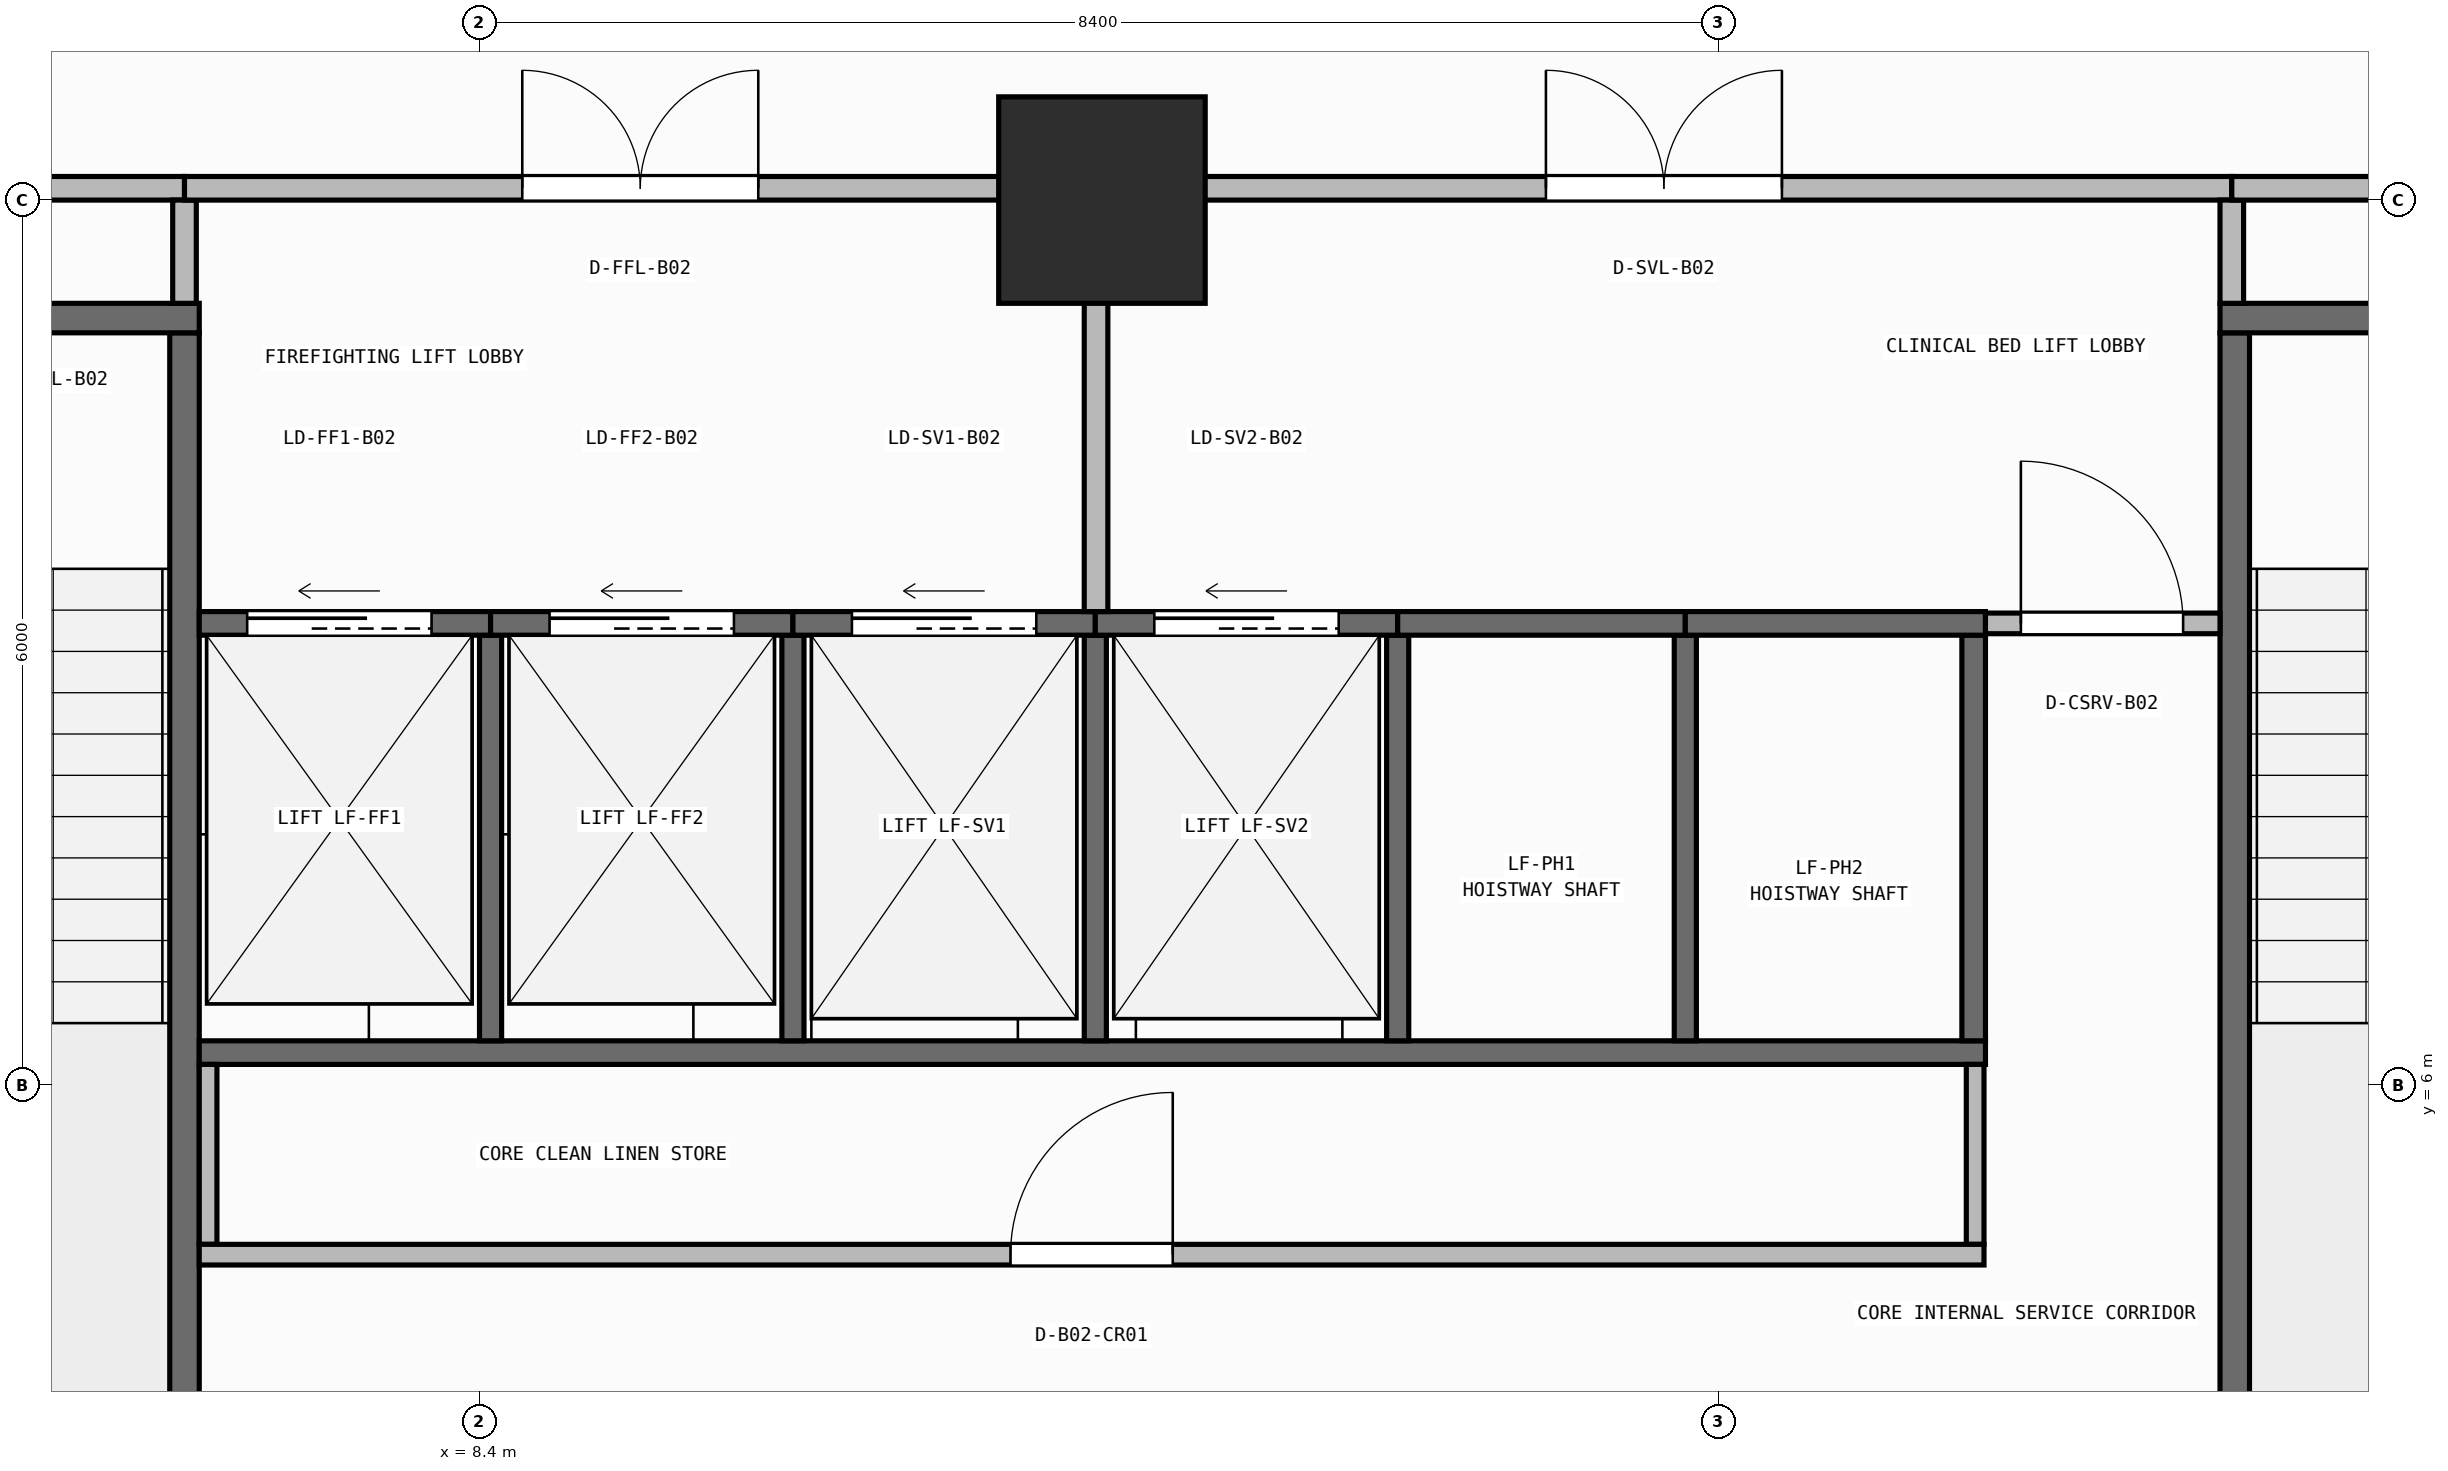
"""IFC4 building model, lengths in metres.
Left out: names, types, materials, properties, quantities, classifications, styles, units other than length and angle.
Written with IfcOpenShell. Run it as: python <this file> out.ifc"""

import sys

from ifc_helpers import new_model, si_unit, direction, frame, frame_2d, origin, origin_2d, place, context, subcontext, project, spatial, rectangle, extrude, element, fill, save


model = new_model("IFC4")
c1 = context("Model", 3, precision=1e-05, world=origin(), true_north=direction((0.0, 1.0)))
c2 = subcontext(c1, "Body", "Model", "MODEL_VIEW")
j1 = project(units=[si_unit("LENGTHUNIT", "METRE"), si_unit("PLANEANGLEUNIT", "RADIAN")], contexts=[c1])
p1 = place(None, origin())
s1 = spatial("IfcSite", under=j1, at=p1, CompositionType="ELEMENT")
p2 = place(p1, origin())
s2 = spatial("IfcBuilding", under=s1, at=p2, CompositionType="ELEMENT")
p3 = place(p2, frame((0.0, 0.0, -9.0)))
s3 = spatial("IfcBuildingStorey", under=s2, at=p3, CompositionType="ELEMENT", Elevation=-9.0)
p4 = place(p3, frame((12.62, 12.0, 0.0), z_axis=(0.0, 0.0, 1.0), x_axis=(1.0, 0.0, 0.0)))
e1 = element("IfcColumn", 1, at=p4, inside=s3, PredefinedType="COLUMN", context=c2, shape_type="SweptSolid", body=[
    extrude(rectangle(XDim=1.4, YDim=1.4, at=origin_2d()), origin(), (0.0, 0.0, 1.0), 4.5),
])
p5 = place(p3, frame((6.4, 3.5, 0.0), z_axis=(0.0, 0.0, 1.0), x_axis=(0.0, 1.0, 0.0)))
e2 = element("IfcWall", 2, at=p5, inside=s3, PredefinedType="SHEAR", context=c2, shape_type="SweptSolid", body=[
    extrude(rectangle(XDim=7.6, YDim=0.2, at=frame_2d((3.8, 0.0))), origin(), (0.0, 0.0, 1.0), 4.24),
])
p6 = place(p3, frame((2.8, 11.2, 0.0), z_axis=(0.0, 0.0, 1.0), x_axis=(1.0, 0.0, 0.0)))
e3 = element("IfcWall", 3, at=p6, inside=s3, PredefinedType="SHEAR", context=c2, shape_type="SweptSolid", body=[
    extrude(rectangle(XDim=3.7, YDim=0.2, at=frame_2d((1.85, 0.0))), origin(), (0.0, 0.0, 1.0), 4.24),
])
p7 = place(p6, frame((1.2, 0.0, 0.0)))
e4 = element("IfcOpeningElement", 4, at=p7, cuts=e3, PredefinedType="OPENING", context=c2, shape_type="SweptSolid", body=[
    extrude(rectangle(XDim=1.3, YDim=2.15, at=frame_2d((0.65, 1.075))), frame((0.0, 0.11, 0.0), z_axis=(0.0, -1.0, 0.0), x_axis=(1.0, 0.0, 0.0)), (0.0, 0.0, 1.0), 0.22),
])
p8 = place(p3, frame((20.3, 3.5, 0.0), z_axis=(0.0, 0.0, 1.0), x_axis=(0.0, 1.0, 0.0)))
e5 = element("IfcWall", 5, at=p8, inside=s3, PredefinedType="SHEAR", context=c2, shape_type="SweptSolid", body=[
    extrude(rectangle(XDim=7.6, YDim=0.2, at=frame_2d((3.8, 0.0))), origin(), (0.0, 0.0, 1.0), 4.24),
])
p9 = place(p3, frame((20.2, 11.2, 0.0), z_axis=(0.0, 0.0, 1.0), x_axis=(1.0, 0.0, 0.0)))
e6 = element("IfcWall", 6, at=p9, inside=s3, PredefinedType="SHEAR", context=c2, shape_type="SweptSolid", body=[
    extrude(rectangle(XDim=3.7, YDim=0.2, at=frame_2d((1.85, 0.0))), origin(), (0.0, 0.0, 1.0), 4.24),
])
p10 = place(p9, frame((1.2, 0.0, 0.0)))
e7 = element("IfcOpeningElement", 7, at=p10, cuts=e6, PredefinedType="OPENING", context=c2, shape_type="SweptSolid", body=[
    extrude(rectangle(XDim=1.3, YDim=2.15, at=frame_2d((0.65, 1.075))), frame((0.0, 0.11, 0.0), z_axis=(0.0, -1.0, 0.0), x_axis=(1.0, 0.0, 0.0)), (0.0, 0.0, 1.0), 0.22),
])
p11 = place(p3, frame((6.5, 6.22, 0.0), z_axis=(0.0, 0.0, 1.0), x_axis=(1.0, 0.0, 0.0)))
e8 = element("IfcWall", 8, at=p11, inside=s3, PredefinedType="SHEAR", context=c2, shape_type="SweptSolid", body=[
    extrude(rectangle(XDim=12.11, YDim=0.16, at=frame_2d((6.055, 0.0))), origin(), (0.0, 0.0, 1.0), 4.24),
])
p12 = place(p3, frame((18.53, 6.3, 0.0), z_axis=(0.0, 0.0, 1.0), x_axis=(0.0, 1.0, 0.0)))
e9 = element("IfcWall", 9, at=p12, inside=s3, PredefinedType="SHEAR", context=c2, shape_type="SweptSolid", body=[
    extrude(rectangle(XDim=2.75, YDim=0.16, at=frame_2d((1.375, 0.0))), origin(), (0.0, 0.0, 1.0), 4.24),
])
for number, where, z_axis, x_axis in (
    (10, (8.475, 6.3, 0.0), (0.0, 0.0, 1.0), (0.0, 1.0, 0.0)),
    (11, (10.525, 6.3, 0.0), (0.0, 0.0, 1.0), (0.0, 1.0, 0.0)),
    (12, (12.575, 6.3, 0.0), (0.0, 0.0, 1.0), (0.0, 1.0, 0.0)),
    (13, (14.625, 6.3, 0.0), (0.0, 0.0, 1.0), (0.0, 1.0, 0.0)),
    (14, (16.575, 6.3, 0.0), (0.0, 0.0, 1.0), (0.0, 1.0, 0.0)),
):
    element("IfcWall", number, at=place(p3, frame(where, z_axis=z_axis, x_axis=x_axis)), inside=s3, PredefinedType="SHEAR", context=c2, shape_type="SweptSolid", body=[
        extrude(rectangle(XDim=2.75, YDim=0.15, at=frame_2d((1.375, 0.0))), origin(), (0.0, 0.0, 1.0), 4.24),
    ])
p13 = place(p3, frame((6.5, 9.13, 0.0), z_axis=(0.0, 0.0, 1.0), x_axis=(1.0, 0.0, 0.0)))
e15 = element("IfcWall", 15, at=p13, inside=s3, PredefinedType="SHEAR", context=c2, shape_type="SweptSolid", body=[
    extrude(rectangle(XDim=1.975, YDim=0.16, at=frame_2d((0.988, 0.0))), origin(), (0.0, 0.0, 1.0), 4.24),
])
p14 = place(p13, frame((0.325, 0.0, 0.0)))
e16 = element("IfcOpeningElement", 16, at=p14, cuts=e15, PredefinedType="OPENING", context=c2, shape_type="SweptSolid", body=[
    extrude(rectangle(XDim=1.25, YDim=2.15, at=frame_2d((0.625, 1.075))), frame((0.0, 0.09, 0.0), z_axis=(0.0, -1.0, 0.0), x_axis=(1.0, 0.0, 0.0)), (0.0, 0.0, 1.0), 0.18),
])
p15 = place(p3, frame((8.475, 9.13, 0.0), z_axis=(0.0, 0.0, 1.0), x_axis=(1.0, 0.0, 0.0)))
e17 = element("IfcWall", 17, at=p15, inside=s3, PredefinedType="SHEAR", context=c2, shape_type="SweptSolid", body=[
    extrude(rectangle(XDim=2.05, YDim=0.16, at=frame_2d((1.025, 0.0))), origin(), (0.0, 0.0, 1.0), 4.24),
])
p16 = place(p15, frame((0.4, 0.0, 0.0)))
e18 = element("IfcOpeningElement", 18, at=p16, cuts=e17, PredefinedType="OPENING", context=c2, shape_type="SweptSolid", body=[
    extrude(rectangle(XDim=1.25, YDim=2.15, at=frame_2d((0.625, 1.075))), frame((0.0, 0.09, 0.0), z_axis=(0.0, -1.0, 0.0), x_axis=(1.0, 0.0, 0.0)), (0.0, 0.0, 1.0), 0.18),
])
p17 = place(p3, frame((10.525, 9.13, 0.0), z_axis=(0.0, 0.0, 1.0), x_axis=(1.0, 0.0, 0.0)))
e19 = element("IfcWall", 19, at=p17, inside=s3, PredefinedType="SHEAR", context=c2, shape_type="SweptSolid", body=[
    extrude(rectangle(XDim=2.05, YDim=0.16, at=frame_2d((1.025, 0.0))), origin(), (0.0, 0.0, 1.0), 4.24),
])
p18 = place(p17, frame((0.4, 0.0, 0.0)))
e20 = element("IfcOpeningElement", 20, at=p18, cuts=e19, PredefinedType="OPENING", context=c2, shape_type="SweptSolid", body=[
    extrude(rectangle(XDim=1.25, YDim=2.15, at=frame_2d((0.625, 1.075))), frame((0.0, 0.09, 0.0), z_axis=(0.0, -1.0, 0.0), x_axis=(1.0, 0.0, 0.0)), (0.0, 0.0, 1.0), 0.18),
])
p19 = place(p3, frame((12.575, 9.13, 0.0), z_axis=(0.0, 0.0, 1.0), x_axis=(1.0, 0.0, 0.0)))
e21 = element("IfcWall", 21, at=p19, inside=s3, PredefinedType="SHEAR", context=c2, shape_type="SweptSolid", body=[
    extrude(rectangle(XDim=2.05, YDim=0.16, at=frame_2d((1.025, 0.0))), origin(), (0.0, 0.0, 1.0), 4.24),
])
p20 = place(p19, frame((0.4, 0.0, 0.0)))
e22 = element("IfcOpeningElement", 22, at=p20, cuts=e21, PredefinedType="OPENING", context=c2, shape_type="SweptSolid", body=[
    extrude(rectangle(XDim=1.25, YDim=2.15, at=frame_2d((0.625, 1.075))), frame((0.0, 0.09, 0.0), z_axis=(0.0, -1.0, 0.0), x_axis=(1.0, 0.0, 0.0)), (0.0, 0.0, 1.0), 0.18),
])
p21 = place(p3, frame((14.625, 9.13, 0.0), z_axis=(0.0, 0.0, 1.0), x_axis=(1.0, 0.0, 0.0)))
e23 = element("IfcWall", 23, at=p21, inside=s3, PredefinedType="SHEAR", context=c2, shape_type="SweptSolid", body=[
    extrude(rectangle(XDim=1.95, YDim=0.16, at=frame_2d((0.975, 0.0))), origin(), (0.0, 0.0, 1.0), 4.24),
])
p22 = place(p3, frame((16.575, 9.13, 0.0), z_axis=(0.0, 0.0, 1.0), x_axis=(1.0, 0.0, 0.0)))
e24 = element("IfcWall", 24, at=p22, inside=s3, PredefinedType="SHEAR", context=c2, shape_type="SweptSolid", body=[
    extrude(rectangle(XDim=2.035, YDim=0.16, at=frame_2d((1.018, 0.0))), origin(), (0.0, 0.0, 1.0), 4.24),
])
for number, where, z_axis, x_axis in (
    (25, (6.56, 4.92, 0.0), (0.0, 0.0, 1.0), (0.0, 1.0, 0.0)),
    (26, (18.54, 4.92, 0.0), (0.0, 0.0, 1.0), (0.0, 1.0, 0.0)),
):
    element("IfcWall", number, at=place(p3, frame(where, z_axis=z_axis, x_axis=x_axis)), inside=s3, PredefinedType="PARTITIONING", context=c2, shape_type="SweptSolid", body=[
        extrude(rectangle(XDim=1.22, YDim=0.12, at=frame_2d((0.61, 0.0))), origin(), (0.0, 0.0, 1.0), 4.24),
    ])
p23 = place(p3, frame((6.5, 4.85, 0.0), z_axis=(0.0, 0.0, 1.0), x_axis=(1.0, 0.0, 0.0)))
e27 = element("IfcWall", 27, at=p23, inside=s3, PredefinedType="PARTITIONING", context=c2, shape_type="SweptSolid", body=[
    extrude(rectangle(XDim=12.1, YDim=0.14, at=frame_2d((6.05, 0.0))), origin(), (0.0, 0.0, 1.0), 4.24),
])
p24 = place(p23, frame((5.5, 0.0, 0.0)))
e28 = element("IfcOpeningElement", 28, at=p24, cuts=e27, PredefinedType="OPENING", context=c2, shape_type="SweptSolid", body=[
    extrude(rectangle(XDim=1.1, YDim=2.1, at=frame_2d((0.55, 1.05))), frame((0.0, 0.08, 0.0), z_axis=(0.0, -1.0, 0.0), x_axis=(1.0, 0.0, 0.0)), (0.0, 0.0, 1.0), 0.16),
])
p25 = place(p3, frame((18.61, 9.13, 0.0), z_axis=(0.0, 0.0, 1.0), x_axis=(1.0, 0.0, 0.0)))
e29 = element("IfcWall", 29, at=p25, inside=s3, PredefinedType="PARTITIONING", context=c2, shape_type="SweptSolid", body=[
    extrude(rectangle(XDim=1.59, YDim=0.14, at=frame_2d((0.795, 0.0))), origin(), (0.0, 0.0, 1.0), 4.24),
])
p26 = place(p25, frame((0.24, 0.0, 0.0)))
e30 = element("IfcOpeningElement", 30, at=p26, cuts=e29, PredefinedType="OPENING", context=c2, shape_type="SweptSolid", body=[
    extrude(rectangle(XDim=1.1, YDim=2.1, at=frame_2d((0.55, 1.05))), frame((0.0, 0.08, 0.0), z_axis=(0.0, -1.0, 0.0), x_axis=(1.0, 0.0, 0.0)), (0.0, 0.0, 1.0), 0.16),
])
p27 = place(p3, frame((2.8, 12.08, 0.0), z_axis=(0.0, 0.0, 1.0), x_axis=(1.0, 0.0, 0.0)))
e31 = element("IfcWall", 31, at=p27, inside=s3, PredefinedType="PARTITIONING", context=c2, shape_type="SweptSolid", body=[
    extrude(rectangle(XDim=3.6, YDim=0.16, at=frame_2d((1.8, 0.0))), origin(), (0.0, 0.0, 1.0), 3.305),
])
p28 = place(p27, frame((1.0, 0.0, 0.0)))
e32 = element("IfcOpeningElement", 32, at=p28, cuts=e31, PredefinedType="OPENING", context=c2, shape_type="SweptSolid", body=[
    extrude(rectangle(XDim=1.6, YDim=2.05, at=frame_2d((0.8, 1.025))), frame((0.0, 0.09, 0.0), z_axis=(0.0, -1.0, 0.0), x_axis=(1.0, 0.0, 0.0)), (0.0, 0.0, 1.0), 0.18),
])
p29 = place(p3, frame((6.4, 11.3, 0.0), z_axis=(0.0, 0.0, 1.0), x_axis=(0.0, 1.0, 0.0)))
e33 = element("IfcWall", 33, at=p29, inside=s3, PredefinedType="PARTITIONING", context=c2, shape_type="SweptSolid", body=[
    extrude(rectangle(XDim=0.7, YDim=0.16, at=frame_2d((0.35, 0.0))), origin(), (0.0, 0.0, 1.0), 4.24),
])
p30 = place(p3, frame((6.4, 12.08, 0.0), z_axis=(0.0, 0.0, 1.0), x_axis=(1.0, 0.0, 0.0)))
e34 = element("IfcWall", 34, at=p30, inside=s3, PredefinedType="PARTITIONING", context=c2, shape_type="SweptSolid", body=[
    extrude(rectangle(XDim=6.18, YDim=0.16, at=frame_2d((3.09, 0.0))), origin(), (0.0, 0.0, 1.0), 3.305),
])
p31 = place(p30, frame((2.29, 0.0, 0.0)))
e35 = element("IfcOpeningElement", 35, at=p31, cuts=e34, PredefinedType="OPENING", context=c2, shape_type="SweptSolid", body=[
    extrude(rectangle(XDim=1.6, YDim=2.05, at=frame_2d((0.8, 1.025))), frame((0.0, 0.09, 0.0), z_axis=(0.0, -1.0, 0.0), x_axis=(1.0, 0.0, 0.0)), (0.0, 0.0, 1.0), 0.18),
])
p32 = place(p3, frame((12.58, 9.21, 0.0), z_axis=(0.0, 0.0, 1.0), x_axis=(0.0, 1.0, 0.0)))
e36 = element("IfcWall", 36, at=p32, inside=s3, PredefinedType="PARTITIONING", context=c2, shape_type="SweptSolid", body=[
    extrude(rectangle(XDim=2.79, YDim=0.16, at=frame_2d((1.395, 0.0))), origin(), (0.0, 0.0, 1.0), 4.24),
])
p33 = place(p3, frame((12.58, 12.08, 0.0), z_axis=(0.0, 0.0, 1.0), x_axis=(1.0, 0.0, 0.0)))
e37 = element("IfcWall", 37, at=p33, inside=s3, PredefinedType="PARTITIONING", context=c2, shape_type="SweptSolid", body=[
    extrude(rectangle(XDim=7.7, YDim=0.16, at=frame_2d((3.85, 0.0))), origin(), (0.0, 0.0, 1.0), 3.305),
])
p34 = place(p33, frame((3.05, 0.0, 0.0)))
e38 = element("IfcOpeningElement", 38, at=p34, cuts=e37, PredefinedType="OPENING", context=c2, shape_type="SweptSolid", body=[
    extrude(rectangle(XDim=1.6, YDim=2.05, at=frame_2d((0.8, 1.025))), frame((0.0, 0.09, 0.0), z_axis=(0.0, -1.0, 0.0), x_axis=(1.0, 0.0, 0.0)), (0.0, 0.0, 1.0), 0.18),
])
p35 = place(p3, frame((20.28, 11.3, 0.0), z_axis=(0.0, 0.0, 1.0), x_axis=(0.0, 1.0, 0.0)))
e39 = element("IfcWall", 39, at=p35, inside=s3, PredefinedType="PARTITIONING", context=c2, shape_type="SweptSolid", body=[
    extrude(rectangle(XDim=0.7, YDim=0.16, at=frame_2d((0.35, 0.0))), origin(), (0.0, 0.0, 1.0), 4.24),
])
p36 = place(p3, frame((20.28, 12.08, 0.0), z_axis=(0.0, 0.0, 1.0), x_axis=(1.0, 0.0, 0.0)))
e40 = element("IfcWall", 40, at=p36, inside=s3, PredefinedType="PARTITIONING", context=c2, shape_type="SweptSolid", body=[
    extrude(rectangle(XDim=3.62, YDim=0.16, at=frame_2d((1.81, 0.0))), origin(), (0.0, 0.0, 1.0), 3.305),
])
p37 = place(p36, frame((1.01, 0.0, 0.0)))
e41 = element("IfcOpeningElement", 41, at=p37, cuts=e40, PredefinedType="OPENING", context=c2, shape_type="SweptSolid", body=[
    extrude(rectangle(XDim=1.6, YDim=2.05, at=frame_2d((0.8, 1.025))), frame((0.0, 0.09, 0.0), z_axis=(0.0, -1.0, 0.0), x_axis=(1.0, 0.0, 0.0)), (0.0, 0.0, 1.0), 0.18),
])
p38 = place(p14, origin())
e42 = element("IfcDoor", 42, at=p38, inside=s3, OperationType="SLIDING_TO_LEFT", PredefinedType="DOOR", context=c2, shape_type="SweptSolid", body=[
    extrude(rectangle(XDim=1.25, YDim=2.15, at=frame_2d((0.625, 1.075))), frame((0.0, 0.025, 0.0), z_axis=(0.0, -1.0, 0.0), x_axis=(1.0, 0.0, 0.0)), (0.0, 0.0, 1.0), 0.05),
])
fill(e16, e42)
p39 = place(p16, origin())
e43 = element("IfcDoor", 43, at=p39, inside=s3, OperationType="SLIDING_TO_LEFT", PredefinedType="DOOR", context=c2, shape_type="SweptSolid", body=[
    extrude(rectangle(XDim=1.25, YDim=2.15, at=frame_2d((0.625, 1.075))), frame((0.0, 0.025, 0.0), z_axis=(0.0, -1.0, 0.0), x_axis=(1.0, 0.0, 0.0)), (0.0, 0.0, 1.0), 0.05),
])
fill(e18, e43)
p40 = place(p18, origin())
e44 = element("IfcDoor", 44, at=p40, inside=s3, OperationType="SLIDING_TO_LEFT", PredefinedType="DOOR", context=c2, shape_type="SweptSolid", body=[
    extrude(rectangle(XDim=1.25, YDim=2.15, at=frame_2d((0.625, 1.075))), frame((0.0, 0.025, 0.0), z_axis=(0.0, -1.0, 0.0), x_axis=(1.0, 0.0, 0.0)), (0.0, 0.0, 1.0), 0.05),
])
fill(e20, e44)
p41 = place(p20, origin())
e45 = element("IfcDoor", 45, at=p41, inside=s3, OperationType="SLIDING_TO_LEFT", PredefinedType="DOOR", context=c2, shape_type="SweptSolid", body=[
    extrude(rectangle(XDim=1.25, YDim=2.15, at=frame_2d((0.625, 1.075))), frame((0.0, 0.025, 0.0), z_axis=(0.0, -1.0, 0.0), x_axis=(1.0, 0.0, 0.0)), (0.0, 0.0, 1.0), 0.05),
])
fill(e22, e45)
p42 = place(p24, origin())
e46 = element("IfcDoor", 46, at=p42, inside=s3, OperationType="SINGLE_SWING_RIGHT", PredefinedType="DOOR", context=c2, shape_type="SweptSolid", body=[
    extrude(rectangle(XDim=1.1, YDim=2.1, at=frame_2d((0.55, 1.05))), frame((0.0, 0.025, 0.0), z_axis=(0.0, -1.0, 0.0), x_axis=(1.0, 0.0, 0.0)), (0.0, 0.0, 1.0), 0.05),
])
fill(e28, e46)
p43 = place(p26, origin())
e47 = element("IfcDoor", 47, at=p43, inside=s3, OperationType="SINGLE_SWING_LEFT", PredefinedType="DOOR", context=c2, shape_type="SweptSolid", body=[
    extrude(rectangle(XDim=1.1, YDim=2.1, at=frame_2d((0.55, 1.05))), frame((0.0, 0.025, 0.0), z_axis=(0.0, -1.0, 0.0), x_axis=(1.0, 0.0, 0.0)), (0.0, 0.0, 1.0), 0.05),
])
fill(e30, e47)
p44 = place(p31, origin())
e48 = element("IfcDoor", 48, at=p44, inside=s3, OperationType="DOUBLE_DOOR_SINGLE_SWING", PredefinedType="DOOR", context=c2, shape_type="SweptSolid", body=[
    extrude(rectangle(XDim=1.6, YDim=2.05, at=frame_2d((0.8, 1.025))), frame((0.0, 0.025, 0.0), z_axis=(0.0, -1.0, 0.0), x_axis=(1.0, 0.0, 0.0)), (0.0, 0.0, 1.0), 0.05),
])
fill(e35, e48)
p45 = place(p34, origin())
e49 = element("IfcDoor", 49, at=p45, inside=s3, OperationType="DOUBLE_DOOR_SINGLE_SWING", PredefinedType="DOOR", context=c2, shape_type="SweptSolid", body=[
    extrude(rectangle(XDim=1.6, YDim=2.05, at=frame_2d((0.8, 1.025))), frame((0.0, 0.025, 0.0), z_axis=(0.0, -1.0, 0.0), x_axis=(1.0, 0.0, 0.0)), (0.0, 0.0, 1.0), 0.05),
])
fill(e38, e49)
save(model, sys.argv[1])
